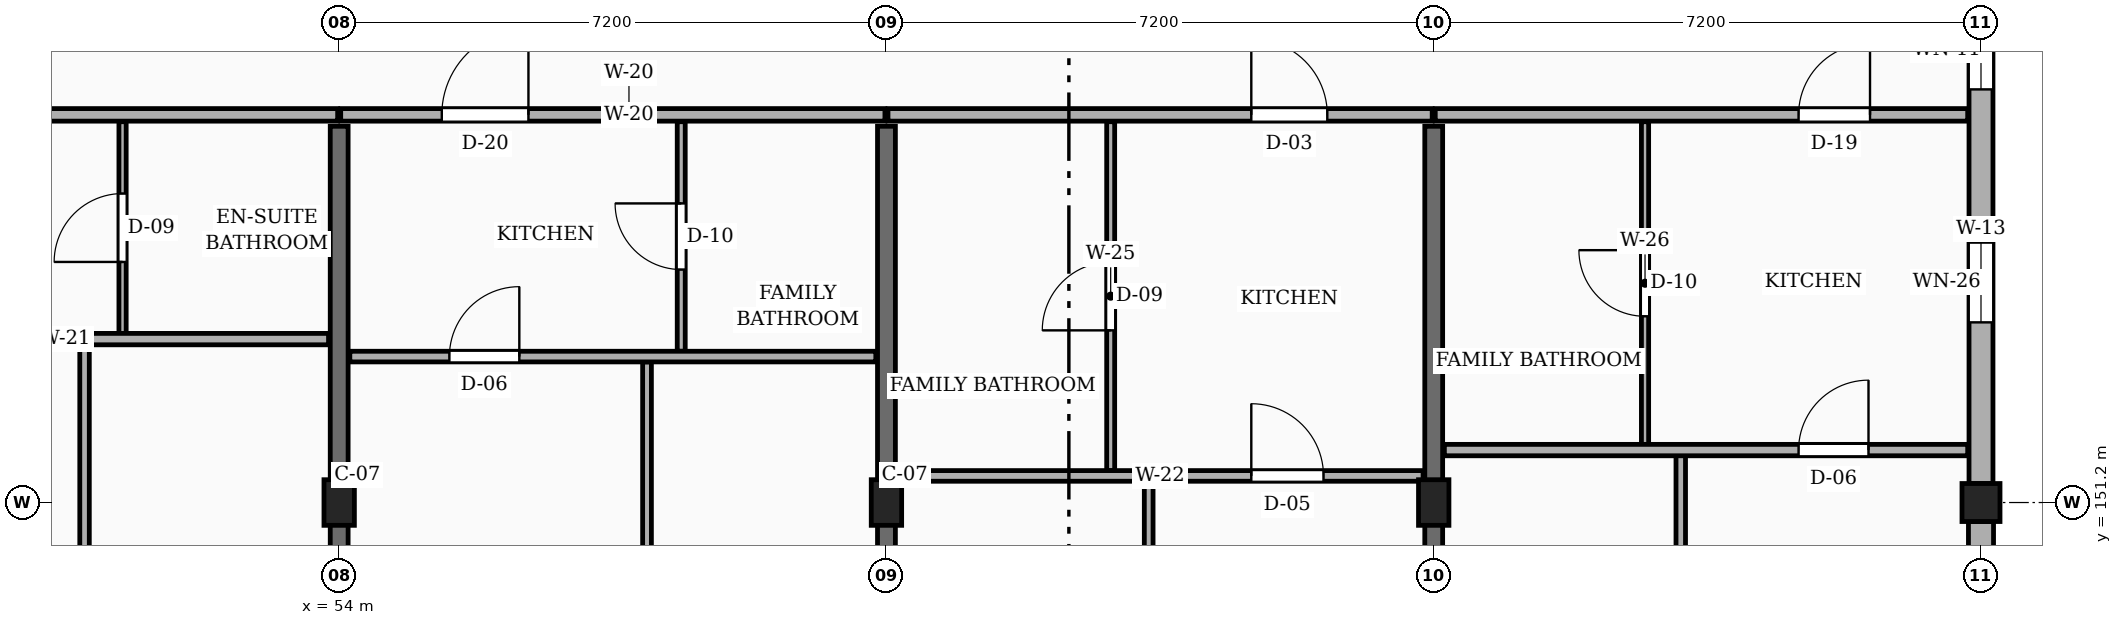
"""IFC4 building model, lengths in metres.
Left out: names, types, materials, properties, quantities, classifications, styles, units other than length and angle.
Written with IfcOpenShell. Run it as: python <this file> out.ifc"""

import sys

from ifc_helpers import new_model, si_unit, direction, frame, frame_2d, origin, origin_2d, place, context, subcontext, project, spatial, rectangle, extrude, element, fill, save


model = new_model("IFC4")
c1 = context("Model", 3, precision=1e-05, world=origin(), true_north=direction((0.0, 1.0)))
c2 = subcontext(c1, "Body", "Model", "MODEL_VIEW")
j1 = project(units=[si_unit("LENGTHUNIT", "METRE"), si_unit("PLANEANGLEUNIT", "RADIAN")], contexts=[c1])
p1 = place(None, origin())
s1 = spatial("IfcSite", under=j1, at=p1, CompositionType="ELEMENT")
p2 = place(p1, origin())
s2 = spatial("IfcBuilding", under=s1, at=p2, CompositionType="ELEMENT")
p3 = place(p2, frame((0.0, 0.0, 23.4)))
s3 = spatial("IfcBuildingStorey", under=s2, at=p3, CompositionType="ELEMENT", Elevation=23.4)
for number, where, z_axis, x_axis in (
    (1, (54.0, 151.2, 0.0), (0.0, 0.0, 1.0), (1.0, 0.0, 0.0)),
    (2, (61.2, 151.2, 0.0), (0.0, 0.0, 1.0), (1.0, 0.0, 0.0)),
    (3, (68.4, 151.2, 0.0), (0.0, 0.0, 1.0), (1.0, 0.0, 0.0)),
):
    element("IfcColumn", number, at=place(p3, frame(where, z_axis=z_axis, x_axis=x_axis)), inside=s3, PredefinedType="COLUMN", context=c2, shape_type="SweptSolid", body=[
        extrude(rectangle(XDim=0.4, YDim=0.6, at=origin_2d()), origin(), (0.0, 0.0, 1.0), 3.15),
    ])
p4 = place(p3, frame((75.6, 151.2, 0.0), z_axis=(0.0, 0.0, 1.0), x_axis=(1.0, 0.0, 0.0)))
e4 = element("IfcColumn", 4, at=p4, inside=s3, PredefinedType="COLUMN", context=c2, shape_type="SweptSolid", body=[
    extrude(rectangle(XDim=0.5, YDim=0.5, at=origin_2d()), origin(), (0.0, 0.0, 1.0), 3.15),
])
for number, where, z_axis, x_axis in (
    (5, (54.0, 144.25, 0.0), (0.0, 0.0, 1.0), (0.0, 1.0, 0.0)),
    (6, (61.2, 144.25, 0.0), (0.0, 0.0, 1.0), (0.0, 1.0, 0.0)),
    (7, (68.4, 144.25, 0.0), (0.0, 0.0, 1.0), (0.0, 1.0, 0.0)),
):
    element("IfcWall", number, at=place(p3, frame(where, z_axis=z_axis, x_axis=x_axis)), inside=s3, PredefinedType="SOLIDWALL", context=c2, shape_type="SweptSolid", body=[
        extrude(rectangle(XDim=11.9, YDim=0.235, at=frame_2d((5.95, 0.0))), origin(), (0.0, 0.0, 1.0), 2.185),
    ])
p5 = place(p3, frame((75.6, 144.25, 0.0), z_axis=(0.0, 0.0, 1.0), x_axis=(0.0, 1.0, 0.0)))
e8 = element("IfcWall", 8, at=p5, inside=s3, PredefinedType="SOLIDWALL", context=c2, shape_type="SweptSolid", body=[
    extrude(rectangle(XDim=6.7, YDim=0.33, at=frame_2d((3.35, 0.0))), origin(), (0.0, 0.0, 1.0), 2.455),
])
p6 = place(p5, frame((0.45, 0.0, 0.78)))
e9 = element("IfcOpeningElement", 9, at=p6, cuts=e8, PredefinedType="OPENING", context=c2, shape_type="SweptSolid", body=[
    extrude(rectangle(XDim=1.46, YDim=1.36, at=frame_2d((0.73, 0.68))), frame((0.0, 0.175, 0.0), z_axis=(0.0, -1.0, 0.0), x_axis=(1.0, 0.0, 0.0)), (0.0, 0.0, 1.0), 0.35),
])
p7 = place(p5, frame((4.65, 0.0, 0.78)))
e10 = element("IfcOpeningElement", 10, at=p7, cuts=e8, PredefinedType="OPENING", context=c2, shape_type="SweptSolid", body=[
    extrude(rectangle(XDim=1.05, YDim=1.44, at=frame_2d((0.525, 0.72))), frame((0.0, 0.175, 0.0), z_axis=(0.0, -1.0, 0.0), x_axis=(1.0, 0.0, 0.0)), (0.0, 0.0, 1.0), 0.35),
])
p8 = place(p3, frame((75.6, 151.45, 0.0), z_axis=(0.0, 0.0, 1.0), x_axis=(0.0, 1.0, 0.0)))
e11 = element("IfcWall", 11, at=p8, inside=s3, PredefinedType="SOLIDWALL", context=c2, shape_type="SweptSolid", body=[
    extrude(rectangle(XDim=6.7, YDim=0.315, at=frame_2d((3.35, 0.0))), origin(), (0.0, 0.0, 1.0), 2.455),
])
p9 = place(p8, frame((2.12, 0.0, 0.78)))
e12 = element("IfcOpeningElement", 12, at=p9, cuts=e11, PredefinedType="OPENING", context=c2, shape_type="SweptSolid", body=[
    extrude(rectangle(XDim=1.05, YDim=1.44, at=frame_2d((0.525, 0.72))), frame((0.0, 0.167, 0.0), z_axis=(0.0, -1.0, 0.0), x_axis=(1.0, 0.0, 0.0)), (0.0, 0.0, 1.0), 0.335),
])
p10 = place(p8, frame((5.185, 0.0, 0.78)))
e13 = element("IfcOpeningElement", 13, at=p10, cuts=e11, PredefinedType="OPENING", context=c2, shape_type="SweptSolid", body=[
    extrude(rectangle(XDim=1.04, YDim=1.26, at=frame_2d((0.52, 0.63))), frame((0.0, 0.167, 0.0), z_axis=(0.0, -1.0, 0.0), x_axis=(1.0, 0.0, 0.0)), (0.0, 0.0, 1.0), 0.335),
])
p11 = place(p3, frame((46.82, 156.3, 0.0), z_axis=(0.0, 0.0, 1.0), x_axis=(1.0, 0.0, 0.0)))
e14 = element("IfcWall", 14, at=p11, inside=s3, PredefinedType="PARTITIONING", context=c2, shape_type="SweptSolid", body=[
    extrude(rectangle(XDim=7.16, YDim=0.165, at=frame_2d((3.58, 0.0))), origin(), (0.0, 0.0, 1.0), 2.32),
])
p12 = place(p11, frame((1.33, 0.0, 0.0)))
e15 = element("IfcOpeningElement", 15, at=p12, cuts=e14, PredefinedType="OPENING", context=c2, shape_type="SweptSolid", body=[
    extrude(rectangle(XDim=0.94, YDim=2.12, at=frame_2d((0.47, 1.06))), frame((0.0, 0.093, 0.0), z_axis=(0.0, -1.0, 0.0), x_axis=(1.0, 0.0, 0.0)), (0.0, 0.0, 1.0), 0.185),
])
p13 = place(p3, frame((54.02, 156.3, 0.0), z_axis=(0.0, 0.0, 1.0), x_axis=(1.0, 0.0, 0.0)))
e16 = element("IfcWall", 16, at=p13, inside=s3, PredefinedType="PARTITIONING", context=c2, shape_type="SweptSolid", body=[
    extrude(rectangle(XDim=7.16, YDim=0.165, at=frame_2d((3.58, 0.0))), origin(), (0.0, 0.0, 1.0), 2.32),
])
p14 = place(p13, frame((1.33, 0.0, 0.0)))
e17 = element("IfcOpeningElement", 17, at=p14, cuts=e16, PredefinedType="OPENING", context=c2, shape_type="SweptSolid", body=[
    extrude(rectangle(XDim=1.14, YDim=2.18, at=frame_2d((0.57, 1.09))), frame((0.0, 0.093, 0.0), z_axis=(0.0, -1.0, 0.0), x_axis=(1.0, 0.0, 0.0)), (0.0, 0.0, 1.0), 0.185),
])
p15 = place(p3, frame((61.22, 156.3, 0.0), z_axis=(0.0, 0.0, 1.0), x_axis=(1.0, 0.0, 0.0)))
e18 = element("IfcWall", 18, at=p15, inside=s3, PredefinedType="PARTITIONING", context=c2, shape_type="SweptSolid", body=[
    extrude(rectangle(XDim=7.16, YDim=0.165, at=frame_2d((3.58, 0.0))), origin(), (0.0, 0.0, 1.0), 2.32),
])
p16 = place(p15, frame((4.78, 0.0, 0.0)))
e19 = element("IfcOpeningElement", 19, at=p16, cuts=e18, PredefinedType="OPENING", context=c2, shape_type="SweptSolid", body=[
    extrude(rectangle(XDim=1.0, YDim=2.15, at=frame_2d((0.5, 1.075))), frame((0.0, 0.093, 0.0), z_axis=(0.0, -1.0, 0.0), x_axis=(1.0, 0.0, 0.0)), (0.0, 0.0, 1.0), 0.185),
])
p17 = place(p3, frame((68.42, 156.3, 0.0), z_axis=(0.0, 0.0, 1.0), x_axis=(1.0, 0.0, 0.0)))
e20 = element("IfcWall", 20, at=p17, inside=s3, PredefinedType="PARTITIONING", context=c2, shape_type="SweptSolid", body=[
    extrude(rectangle(XDim=7.005, YDim=0.165, at=frame_2d((3.502, 0.0))), origin(), (0.0, 0.0, 1.0), 2.32),
])
p18 = place(p17, frame((4.78, 0.0, 0.0)))
e21 = element("IfcOpeningElement", 21, at=p18, cuts=e20, PredefinedType="OPENING", context=c2, shape_type="SweptSolid", body=[
    extrude(rectangle(XDim=0.94, YDim=2.12, at=frame_2d((0.47, 1.06))), frame((0.0, 0.093, 0.0), z_axis=(0.0, -1.0, 0.0), x_axis=(1.0, 0.0, 0.0)), (0.0, 0.0, 1.0), 0.185),
])
p19 = place(p3, frame((50.65, 144.175, 0.0), z_axis=(0.0, 0.0, 1.0), x_axis=(0.0, 1.0, 0.0)))
e22 = element("IfcWall", 22, at=p19, inside=s3, PredefinedType="PARTITIONING", context=c2, shape_type="SweptSolid", body=[
    extrude(rectangle(XDim=9.105, YDim=0.125, at=frame_2d((4.552, 0.0))), origin(), (0.0, 0.0, 1.0), 2.32),
])
p20 = place(p19, frame((4.103, 0.0, 0.0)))
e23 = element("IfcOpeningElement", 23, at=p20, cuts=e22, PredefinedType="OPENING", context=c2, shape_type="SweptSolid", body=[
    extrude(rectangle(XDim=0.9, YDim=2.1, at=frame_2d((0.45, 1.05))), frame((0.0, 0.073, 0.0), z_axis=(0.0, -1.0, 0.0), x_axis=(1.0, 0.0, 0.0)), (0.0, 0.0, 1.0), 0.145),
])
p21 = place(p3, frame((51.15, 153.42, 0.0), z_axis=(0.0, 0.0, 1.0), x_axis=(0.0, 1.0, 0.0)))
e24 = element("IfcWall", 24, at=p21, inside=s3, PredefinedType="PARTITIONING", context=c2, shape_type="SweptSolid", body=[
    extrude(rectangle(XDim=2.79, YDim=0.095, at=frame_2d((1.395, 0.0))), origin(), (0.0, 0.0, 1.0), 2.32),
])
p22 = place(p21, frame((0.945, 0.0, 0.0)))
e25 = element("IfcOpeningElement", 25, at=p22, cuts=e24, PredefinedType="OPENING", context=c2, shape_type="SweptSolid", body=[
    extrude(rectangle(XDim=0.9, YDim=2.05, at=frame_2d((0.45, 1.025))), frame((0.0, 0.058, 0.0), z_axis=(0.0, -1.0, 0.0), x_axis=(1.0, 0.0, 0.0)), (0.0, 0.0, 1.0), 0.115),
])
p23 = place(p3, frame((46.94, 153.35, 0.0), z_axis=(0.0, 0.0, 1.0), x_axis=(1.0, 0.0, 0.0)))
e26 = element("IfcWall", 26, at=p23, inside=s3, PredefinedType="PARTITIONING", context=c2, shape_type="SweptSolid", body=[
    extrude(rectangle(XDim=6.92, YDim=0.15, at=frame_2d((3.46, 0.0))), origin(), (0.0, 0.0, 1.0), 2.32),
])
p24 = place(p23, frame((1.31, 0.0, 0.0)))
e27 = element("IfcOpeningElement", 27, at=p24, cuts=e26, PredefinedType="OPENING", context=c2, shape_type="SweptSolid", body=[
    extrude(rectangle(XDim=0.95, YDim=2.1, at=frame_2d((0.475, 1.05))), frame((0.0, 0.085, 0.0), z_axis=(0.0, -1.0, 0.0), x_axis=(1.0, 0.0, 0.0)), (0.0, 0.0, 1.0), 0.17),
])
p25 = place(p3, frame((58.05, 144.175, 0.0), z_axis=(0.0, 0.0, 1.0), x_axis=(0.0, 1.0, 0.0)))
e28 = element("IfcWall", 28, at=p25, inside=s3, PredefinedType="PARTITIONING", context=c2, shape_type="SweptSolid", body=[
    extrude(rectangle(XDim=8.875, YDim=0.115, at=frame_2d((4.438, 0.0))), origin(), (0.0, 0.0, 1.0), 2.32),
])
p26 = place(p25, frame((3.998, 0.0, 0.0)))
e29 = element("IfcOpeningElement", 29, at=p26, cuts=e28, PredefinedType="OPENING", context=c2, shape_type="SweptSolid", body=[
    extrude(rectangle(XDim=0.88, YDim=2.08, at=frame_2d((0.44, 1.04))), frame((0.0, 0.067, 0.0), z_axis=(0.0, -1.0, 0.0), x_axis=(1.0, 0.0, 0.0)), (0.0, 0.0, 1.0), 0.135),
])
p27 = place(p3, frame((58.5, 153.19, 0.0), z_axis=(0.0, 0.0, 1.0), x_axis=(0.0, 1.0, 0.0)))
e30 = element("IfcWall", 30, at=p27, inside=s3, PredefinedType="PARTITIONING", context=c2, shape_type="SweptSolid", body=[
    extrude(rectangle(XDim=3.02, YDim=0.105, at=frame_2d((1.51, 0.0))), origin(), (0.0, 0.0, 1.0), 2.32),
])
p28 = place(p27, frame((1.075, 0.0, 0.0)))
e31 = element("IfcOpeningElement", 31, at=p28, cuts=e30, PredefinedType="OPENING", context=c2, shape_type="SweptSolid", body=[
    extrude(rectangle(XDim=0.87, YDim=2.05, at=frame_2d((0.435, 1.025))), frame((0.0, 0.062, 0.0), z_axis=(0.0, -1.0, 0.0), x_axis=(1.0, 0.0, 0.0)), (0.0, 0.0, 1.0), 0.125),
])
p29 = place(p3, frame((54.14, 153.12, 0.0), z_axis=(0.0, 0.0, 1.0), x_axis=(1.0, 0.0, 0.0)))
e32 = element("IfcWall", 32, at=p29, inside=s3, PredefinedType="PARTITIONING", context=c2, shape_type="SweptSolid", body=[
    extrude(rectangle(XDim=6.92, YDim=0.14, at=frame_2d((3.46, 0.0))), origin(), (0.0, 0.0, 1.0), 2.32),
])
p30 = place(p29, frame((1.31, 0.0, 0.0)))
e33 = element("IfcOpeningElement", 33, at=p30, cuts=e32, PredefinedType="OPENING", context=c2, shape_type="SweptSolid", body=[
    extrude(rectangle(XDim=0.92, YDim=2.1, at=frame_2d((0.46, 1.05))), frame((0.0, 0.08, 0.0), z_axis=(0.0, -1.0, 0.0), x_axis=(1.0, 0.0, 0.0)), (0.0, 0.0, 1.0), 0.16),
])
p31 = place(p3, frame((64.65, 144.175, 0.0), z_axis=(0.0, 0.0, 1.0), x_axis=(0.0, 1.0, 0.0)))
e34 = element("IfcWall", 34, at=p31, inside=s3, PredefinedType="PARTITIONING", context=c2, shape_type="SweptSolid", body=[
    extrude(rectangle(XDim=7.305, YDim=0.115, at=frame_2d((3.652, 0.0))), origin(), (0.0, 0.0, 1.0), 2.32),
])
p32 = place(p31, frame((3.202, 0.0, 0.0)))
e35 = element("IfcOpeningElement", 35, at=p32, cuts=e34, PredefinedType="OPENING", context=c2, shape_type="SweptSolid", body=[
    extrude(rectangle(XDim=0.9, YDim=2.1, at=frame_2d((0.45, 1.05))), frame((0.0, 0.067, 0.0), z_axis=(0.0, -1.0, 0.0), x_axis=(1.0, 0.0, 0.0)), (0.0, 0.0, 1.0), 0.135),
])
p33 = place(p3, frame((64.15, 151.62, 0.0), z_axis=(0.0, 0.0, 1.0), x_axis=(0.0, 1.0, 0.0)))
e36 = element("IfcWall", 36, at=p33, inside=s3, PredefinedType="PARTITIONING", context=c2, shape_type="SweptSolid", body=[
    extrude(rectangle(XDim=4.59, YDim=0.105, at=frame_2d((2.295, 0.0))), origin(), (0.0, 0.0, 1.0), 2.32),
])
p34 = place(p33, frame((1.845, 0.0, 0.0)))
e37 = element("IfcOpeningElement", 37, at=p34, cuts=e36, PredefinedType="OPENING", context=c2, shape_type="SweptSolid", body=[
    extrude(rectangle(XDim=0.9, YDim=2.05, at=frame_2d((0.45, 1.025))), frame((0.0, 0.062, 0.0), z_axis=(0.0, -1.0, 0.0), x_axis=(1.0, 0.0, 0.0)), (0.0, 0.0, 1.0), 0.125),
])
p35 = place(p3, frame((61.34, 151.55, 0.0), z_axis=(0.0, 0.0, 1.0), x_axis=(1.0, 0.0, 0.0)))
e38 = element("IfcWall", 38, at=p35, inside=s3, PredefinedType="PARTITIONING", context=c2, shape_type="SweptSolid", body=[
    extrude(rectangle(XDim=6.92, YDim=0.14, at=frame_2d((3.46, 0.0))), origin(), (0.0, 0.0, 1.0), 2.32),
])
p36 = place(p35, frame((4.66, 0.0, 0.0)))
e39 = element("IfcOpeningElement", 39, at=p36, cuts=e38, PredefinedType="OPENING", context=c2, shape_type="SweptSolid", body=[
    extrude(rectangle(XDim=0.95, YDim=2.1, at=frame_2d((0.475, 1.05))), frame((0.0, 0.08, 0.0), z_axis=(0.0, -1.0, 0.0), x_axis=(1.0, 0.0, 0.0)), (0.0, 0.0, 1.0), 0.16),
])
p37 = place(p3, frame((71.65, 144.175, 0.0), z_axis=(0.0, 0.0, 1.0), x_axis=(0.0, 1.0, 0.0)))
e40 = element("IfcWall", 40, at=p37, inside=s3, PredefinedType="PARTITIONING", context=c2, shape_type="SweptSolid", body=[
    extrude(rectangle(XDim=7.645, YDim=0.125, at=frame_2d((3.823, 0.0))), origin(), (0.0, 0.0, 1.0), 2.32),
])
p38 = place(p37, frame((3.383, 0.0, 0.0)))
e41 = element("IfcOpeningElement", 41, at=p38, cuts=e40, PredefinedType="OPENING", context=c2, shape_type="SweptSolid", body=[
    extrude(rectangle(XDim=0.88, YDim=2.08, at=frame_2d((0.44, 1.04))), frame((0.0, 0.073, 0.0), z_axis=(0.0, -1.0, 0.0), x_axis=(1.0, 0.0, 0.0)), (0.0, 0.0, 1.0), 0.145),
])
p39 = place(p3, frame((71.18, 151.96, 0.0), z_axis=(0.0, 0.0, 1.0), x_axis=(0.0, 1.0, 0.0)))
e42 = element("IfcWall", 42, at=p39, inside=s3, PredefinedType="PARTITIONING", context=c2, shape_type="SweptSolid", body=[
    extrude(rectangle(XDim=4.25, YDim=0.095, at=frame_2d((2.125, 0.0))), origin(), (0.0, 0.0, 1.0), 2.32),
])
p40 = place(p39, frame((1.69, 0.0, 0.0)))
e43 = element("IfcOpeningElement", 43, at=p40, cuts=e42, PredefinedType="OPENING", context=c2, shape_type="SweptSolid", body=[
    extrude(rectangle(XDim=0.87, YDim=2.05, at=frame_2d((0.435, 1.025))), frame((0.0, 0.058, 0.0), z_axis=(0.0, -1.0, 0.0), x_axis=(1.0, 0.0, 0.0)), (0.0, 0.0, 1.0), 0.115),
])
p41 = place(p3, frame((68.54, 151.89, 0.0), z_axis=(0.0, 0.0, 1.0), x_axis=(1.0, 0.0, 0.0)))
e44 = element("IfcWall", 44, at=p41, inside=s3, PredefinedType="PARTITIONING", context=c2, shape_type="SweptSolid", body=[
    extrude(rectangle(XDim=6.885, YDim=0.15, at=frame_2d((3.442, 0.0))), origin(), (0.0, 0.0, 1.0), 2.32),
])
p42 = place(p41, frame((4.66, 0.0, 0.0)))
e45 = element("IfcOpeningElement", 45, at=p42, cuts=e44, PredefinedType="OPENING", context=c2, shape_type="SweptSolid", body=[
    extrude(rectangle(XDim=0.92, YDim=2.1, at=frame_2d((0.46, 1.05))), frame((0.0, 0.085, 0.0), z_axis=(0.0, -1.0, 0.0), x_axis=(1.0, 0.0, 0.0)), (0.0, 0.0, 1.0), 0.17),
])
p43 = place(p9, origin())
e46 = element("IfcWindow", 46, at=p43, inside=s3, PartitioningType="SINGLE_PANEL", PredefinedType="WINDOW", context=c2, shape_type="SweptSolid", body=[
    extrude(rectangle(XDim=1.05, YDim=1.44, at=frame_2d((0.525, 0.72))), frame((0.0, 0.03, 0.0), z_axis=(0.0, -1.0, 0.0), x_axis=(1.0, 0.0, 0.0)), (0.0, 0.0, 1.0), 0.06),
])
fill(e12, e46)
p44 = place(p10, origin())
e47 = element("IfcWindow", 47, at=p44, inside=s3, PartitioningType="SINGLE_PANEL", PredefinedType="WINDOW", context=c2, shape_type="SweptSolid", body=[
    extrude(rectangle(XDim=1.04, YDim=1.26, at=frame_2d((0.52, 0.63))), frame((0.0, 0.03, 0.0), z_axis=(0.0, -1.0, 0.0), x_axis=(1.0, 0.0, 0.0)), (0.0, 0.0, 1.0), 0.06),
])
fill(e13, e47)
p45 = place(p14, origin())
e48 = element("IfcDoor", 48, at=p45, inside=s3, OperationType="SINGLE_SWING_RIGHT", PredefinedType="DOOR", context=c2, shape_type="SweptSolid", body=[
    extrude(rectangle(XDim=1.14, YDim=2.18, at=frame_2d((0.57, 1.09))), frame((0.0, 0.025, 0.0), z_axis=(0.0, -1.0, 0.0), x_axis=(1.0, 0.0, 0.0)), (0.0, 0.0, 1.0), 0.05),
])
fill(e17, e48)
p46 = place(p16, origin())
e49 = element("IfcDoor", 49, at=p46, inside=s3, OperationType="SINGLE_SWING_LEFT", PredefinedType="DOOR", context=c2, shape_type="SweptSolid", body=[
    extrude(rectangle(XDim=1.0, YDim=2.15, at=frame_2d((0.5, 1.075))), frame((0.0, 0.025, 0.0), z_axis=(0.0, -1.0, 0.0), x_axis=(1.0, 0.0, 0.0)), (0.0, 0.0, 1.0), 0.05),
])
fill(e19, e49)
p47 = place(p18, origin())
e50 = element("IfcDoor", 50, at=p47, inside=s3, OperationType="SINGLE_SWING_RIGHT", PredefinedType="DOOR", context=c2, shape_type="SweptSolid", body=[
    extrude(rectangle(XDim=0.94, YDim=2.12, at=frame_2d((0.47, 1.06))), frame((0.0, 0.025, 0.0), z_axis=(0.0, -1.0, 0.0), x_axis=(1.0, 0.0, 0.0)), (0.0, 0.0, 1.0), 0.05),
])
fill(e21, e50)
p48 = place(p22, origin())
e51 = element("IfcDoor", 51, at=p48, inside=s3, OperationType="SINGLE_SWING_LEFT", PredefinedType="DOOR", context=c2, shape_type="SweptSolid", body=[
    extrude(rectangle(XDim=0.9, YDim=2.05, at=frame_2d((0.45, 1.025))), frame((0.0, 0.025, 0.0), z_axis=(0.0, -1.0, 0.0), x_axis=(1.0, 0.0, 0.0)), (0.0, 0.0, 1.0), 0.05),
])
fill(e25, e51)
p49 = place(p28, origin())
e52 = element("IfcDoor", 52, at=p49, inside=s3, OperationType="SINGLE_SWING_RIGHT", PredefinedType="DOOR", context=c2, shape_type="SweptSolid", body=[
    extrude(rectangle(XDim=0.87, YDim=2.05, at=frame_2d((0.435, 1.025))), frame((0.0, 0.025, 0.0), z_axis=(0.0, -1.0, 0.0), x_axis=(1.0, 0.0, 0.0)), (0.0, 0.0, 1.0), 0.05),
])
fill(e31, e52)
p50 = place(p30, origin())
e53 = element("IfcDoor", 53, at=p50, inside=s3, OperationType="SINGLE_SWING_RIGHT", PredefinedType="DOOR", context=c2, shape_type="SweptSolid", body=[
    extrude(rectangle(XDim=0.92, YDim=2.1, at=frame_2d((0.46, 1.05))), frame((0.0, 0.025, 0.0), z_axis=(0.0, -1.0, 0.0), x_axis=(1.0, 0.0, 0.0)), (0.0, 0.0, 1.0), 0.05),
])
fill(e33, e53)
p51 = place(p34, origin())
e54 = element("IfcDoor", 54, at=p51, inside=s3, OperationType="SINGLE_SWING_LEFT", PredefinedType="DOOR", context=c2, shape_type="SweptSolid", body=[
    extrude(rectangle(XDim=0.9, YDim=2.05, at=frame_2d((0.45, 1.025))), frame((0.0, 0.025, 0.0), z_axis=(0.0, -1.0, 0.0), x_axis=(1.0, 0.0, 0.0)), (0.0, 0.0, 1.0), 0.05),
])
fill(e37, e54)
p52 = place(p36, origin())
e55 = element("IfcDoor", 55, at=p52, inside=s3, OperationType="SINGLE_SWING_LEFT", PredefinedType="DOOR", context=c2, shape_type="SweptSolid", body=[
    extrude(rectangle(XDim=0.95, YDim=2.1, at=frame_2d((0.475, 1.05))), frame((0.0, 0.025, 0.0), z_axis=(0.0, -1.0, 0.0), x_axis=(1.0, 0.0, 0.0)), (0.0, 0.0, 1.0), 0.05),
])
fill(e39, e55)
p53 = place(p40, origin())
e56 = element("IfcDoor", 56, at=p53, inside=s3, OperationType="SINGLE_SWING_RIGHT", PredefinedType="DOOR", context=c2, shape_type="SweptSolid", body=[
    extrude(rectangle(XDim=0.87, YDim=2.05, at=frame_2d((0.435, 1.025))), frame((0.0, 0.025, 0.0), z_axis=(0.0, -1.0, 0.0), x_axis=(1.0, 0.0, 0.0)), (0.0, 0.0, 1.0), 0.05),
])
fill(e43, e56)
p54 = place(p42, origin())
e57 = element("IfcDoor", 57, at=p54, inside=s3, OperationType="SINGLE_SWING_RIGHT", PredefinedType="DOOR", context=c2, shape_type="SweptSolid", body=[
    extrude(rectangle(XDim=0.92, YDim=2.1, at=frame_2d((0.46, 1.05))), frame((0.0, 0.025, 0.0), z_axis=(0.0, -1.0, 0.0), x_axis=(1.0, 0.0, 0.0)), (0.0, 0.0, 1.0), 0.05),
])
fill(e45, e57)
save(model, sys.argv[1])
